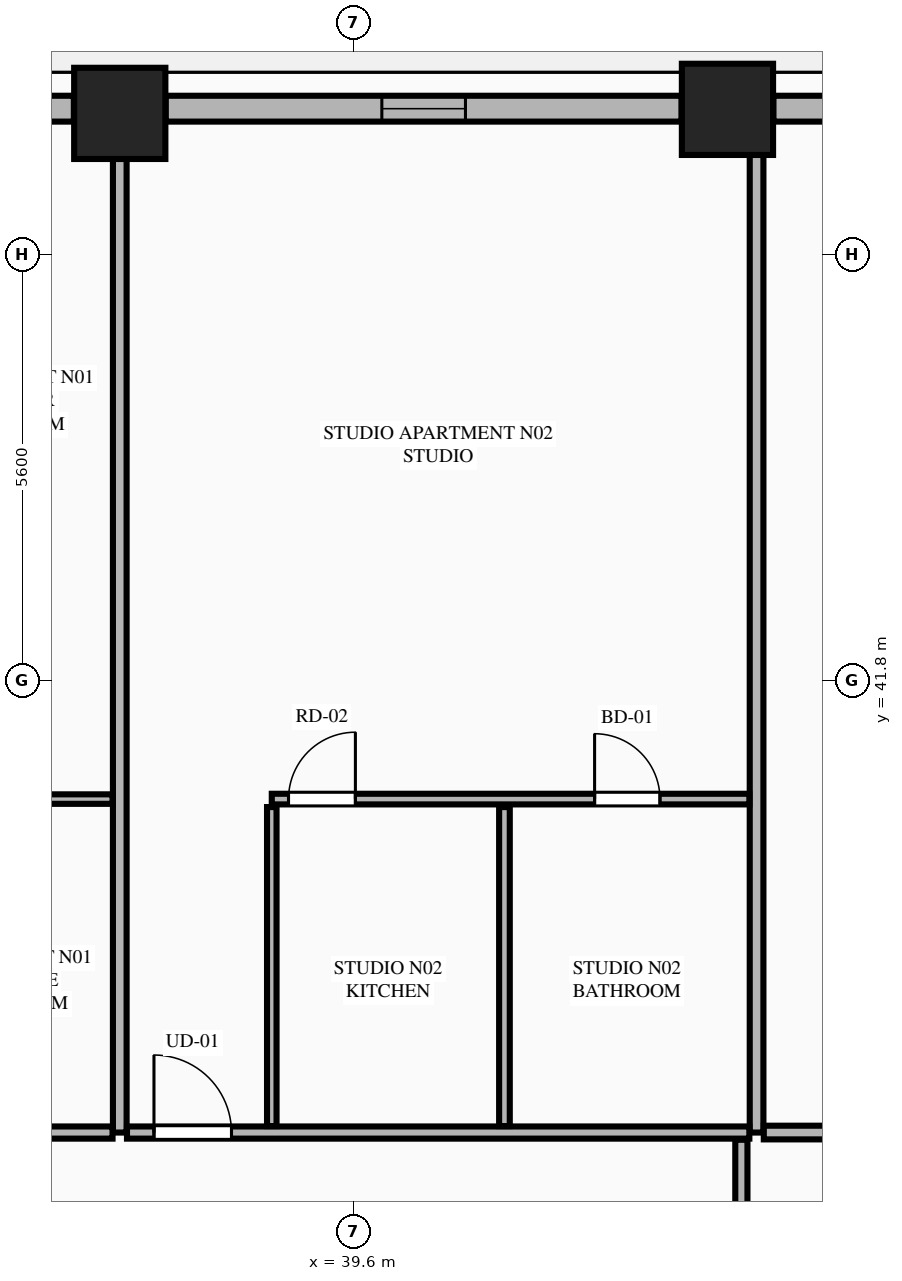
"""IFC4 building model, lengths in metres.
Left out: names, types, materials, properties, quantities, classifications, styles, units other than length and angle.
Written with IfcOpenShell. Run it as: python <this file> out.ifc"""

import sys

from ifc_helpers import new_model, si_unit, direction, frame, frame_2d, origin, origin_2d, place, context, subcontext, project, spatial, rectangle, extrude, element, fill, save


model = new_model("IFC4")
c1 = context("Model", 3, precision=1e-05, world=origin(), true_north=direction((0.0, 1.0)))
c2 = subcontext(c1, "Body", "Model", "MODEL_VIEW")
j1 = project(units=[si_unit("LENGTHUNIT", "METRE"), si_unit("PLANEANGLEUNIT", "RADIAN")], contexts=[c1])
p1 = place(None, origin())
s1 = spatial("IfcSite", under=j1, at=p1, CompositionType="ELEMENT")
p2 = place(p1, origin())
s2 = spatial("IfcBuilding", under=s1, at=p2, CompositionType="ELEMENT")
p3 = place(p2, frame((0.0, 0.0, 71.05)))
s3 = spatial("IfcBuildingStorey", under=s2, at=p3, CompositionType="ELEMENT", Elevation=71.05)
for number, where, z_axis, x_axis in (
    (1, (44.517, 49.311, 0.0), (0.0, 0.0, 1.0), (1.0, 0.0, 0.0)),
    (2, (36.522, 49.258, 0.0), (0.0, 0.0, 1.0), (1.0, 0.0, 0.0)),
):
    element("IfcColumn", number, at=place(p3, frame(where, z_axis=z_axis, x_axis=x_axis)), inside=s3, PredefinedType="COLUMN", context=c2, shape_type="SweptSolid", body=[
        extrude(rectangle(XDim=1.2, YDim=1.2, at=origin_2d()), origin(), (0.0, 0.0, 1.0), 3.55),
    ])
p4 = place(p3, frame((46.366, 49.32, 0.0), z_axis=(0.0, 0.0, 1.0), x_axis=(-1.0, 0.0, 0.0)))
e3 = element("IfcWall", 3, at=p4, inside=s3, PredefinedType="STANDARD", context=c2, shape_type="SweptSolid", body=[
    extrude(rectangle(XDim=1.245, YDim=0.34, at=frame_2d((0.623, 0.0))), origin(), (0.0, 0.0, 1.0), 3.27),
])
p5 = place(p3, frame((43.913, 49.32, 0.0), z_axis=(0.0, 0.0, 1.0), x_axis=(-1.0, 0.0, 0.0)))
e4 = element("IfcWall", 4, at=p5, inside=s3, PredefinedType="STANDARD", context=c2, shape_type="SweptSolid", body=[
    extrude(rectangle(XDim=6.787, YDim=0.34, at=frame_2d((3.394, 0.0))), origin(), (0.0, 0.0, 1.0), 2.652),
])
p6 = place(p5, frame((2.843, 0.0, 0.75)))
e5 = element("IfcOpeningElement", 5, at=p6, cuts=e4, PredefinedType="OPENING", context=c2, shape_type="SweptSolid", body=[
    extrude(rectangle(XDim=1.1, YDim=1.752, at=frame_2d((0.55, 0.876))), frame((0.0, 0.18, 0.0), z_axis=(0.0, -1.0, 0.0), x_axis=(1.0, 0.0, 0.0)), (0.0, 0.0, 1.0), 0.36),
])
p7 = place(p3, frame((35.918, 49.32, 0.0), z_axis=(0.0, 0.0, 1.0), x_axis=(-1.0, 0.0, 0.0)))
e6 = element("IfcWall", 6, at=p7, inside=s3, PredefinedType="STANDARD", context=c2, shape_type="SweptSolid", body=[
    extrude(rectangle(XDim=7.036, YDim=0.34, at=frame_2d((3.518, 0.0))), origin(), (0.0, 0.0, 1.0), 2.652),
])
p8 = place(p7, frame((3.374, 0.0, 0.0)))
e7 = element("IfcOpeningElement", 7, at=p8, cuts=e6, PredefinedType="OPENING", context=c2, shape_type="SweptSolid", body=[
    extrude(rectangle(XDim=1.1, YDim=2.25, at=frame_2d((0.55, 1.125))), frame((0.0, 0.18, 0.0), z_axis=(0.0, -1.0, 0.0), x_axis=(1.0, 0.0, 0.0)), (0.0, 0.0, 1.0), 0.36),
])
p9 = place(p7, frame((0.428, 0.0, 0.75)))
e8 = element("IfcOpeningElement", 8, at=p9, cuts=e6, PredefinedType="OPENING", context=c2, shape_type="SweptSolid", body=[
    extrude(rectangle(XDim=1.1, YDim=1.752, at=frame_2d((0.55, 0.876))), frame((0.0, 0.18, 0.0), z_axis=(0.0, -1.0, 0.0), x_axis=(1.0, 0.0, 0.0)), (0.0, 0.0, 1.0), 0.36),
])
p10 = place(p7, frame((6.013, 0.0, 0.75)))
e9 = element("IfcOpeningElement", 9, at=p10, cuts=e6, PredefinedType="OPENING", context=c2, shape_type="SweptSolid", body=[
    extrude(rectangle(XDim=0.813, YDim=1.752, at=frame_2d((0.406, 0.876))), frame((0.0, 0.18, 0.0), z_axis=(0.0, -1.0, 0.0), x_axis=(1.0, 0.0, 0.0)), (0.0, 0.0, 1.0), 0.36),
])
p11 = place(p3, frame((36.522, 35.85, 0.0), z_axis=(0.0, 0.0, 1.0), x_axis=(0.0, 1.0, 0.0)))
e10 = element("IfcWall", 10, at=p11, inside=s3, PredefinedType="PARTITIONING", context=c2, shape_type="SweptSolid", body=[
    extrude(rectangle(XDim=13.295, YDim=0.18, at=frame_2d((6.647, 0.0))), origin(), (0.0, 0.0, 1.0), 2.64),
])
p12 = place(p3, frame((44.9, 35.85, 0.0), z_axis=(0.0, 0.0, 1.0), x_axis=(0.0, 1.0, 0.0)))
e11 = element("IfcWall", 11, at=p12, inside=s3, PredefinedType="PARTITIONING", context=c2, shape_type="SweptSolid", body=[
    extrude(rectangle(XDim=13.295, YDim=0.18, at=frame_2d((6.647, 0.0))), origin(), (0.0, 0.0, 1.0), 3.27),
])
p13 = place(p3, frame((19.995, 35.85, 0.0), z_axis=(0.0, 0.0, 1.0), x_axis=(1.0, 0.0, 0.0)))
e12 = element("IfcWall", 12, at=p13, inside=s3, PredefinedType="PARTITIONING", context=c2, shape_type="SweptSolid", body=[
    extrude(rectangle(XDim=16.432, YDim=0.16, at=frame_2d((8.216, 0.0))), origin(), (0.0, 0.0, 1.0), 3.27),
])
p14 = place(p13, frame((0.705, 0.0, 0.0)))
e13 = element("IfcOpeningElement", 13, at=p14, cuts=e12, PredefinedType="OPENING", context=c2, shape_type="SweptSolid", body=[
    extrude(rectangle(XDim=1.35, YDim=2.35, at=frame_2d((0.675, 1.175))), frame((0.0, 0.09, 0.0), z_axis=(0.0, -1.0, 0.0), x_axis=(1.0, 0.0, 0.0)), (0.0, 0.0, 1.0), 0.18),
])
p15 = place(p3, frame((30.138, 40.237, 0.0), z_axis=(0.0, 0.0, 1.0), x_axis=(1.0, 0.0, 0.0)))
e14 = element("IfcWall", 14, at=p15, inside=s3, PredefinedType="PARTITIONING", context=c2, shape_type="SweptSolid", body=[
    extrude(rectangle(XDim=6.289, YDim=0.125, at=frame_2d((3.145, 0.0))), origin(), (0.0, 0.0, 1.0), 3.27),
])
p16 = place(p15, frame((4.575, 0.0, 0.0)))
e15 = element("IfcOpeningElement", 15, at=p16, cuts=e14, PredefinedType="OPENING", context=c2, shape_type="SweptSolid", body=[
    extrude(rectangle(XDim=0.86, YDim=2.1, at=frame_2d((0.43, 1.05))), frame((0.0, 0.073, 0.0), z_axis=(0.0, -1.0, 0.0), x_axis=(1.0, 0.0, 0.0)), (0.0, 0.0, 1.0), 0.145),
])
p17 = place(p15, frame((0.3, 0.0, 0.0)))
e16 = element("IfcOpeningElement", 16, at=p17, cuts=e14, PredefinedType="OPENING", context=c2, shape_type="SweptSolid", body=[
    extrude(rectangle(XDim=0.88, YDim=2.15, at=frame_2d((0.44, 1.075))), frame((0.0, 0.073, 0.0), z_axis=(0.0, -1.0, 0.0), x_axis=(1.0, 0.0, 0.0)), (0.0, 0.0, 1.0), 0.145),
])
p18 = place(p3, frame((36.617, 35.85, 0.0), z_axis=(0.0, 0.0, 1.0), x_axis=(1.0, 0.0, 0.0)))
e17 = element("IfcWall", 17, at=p18, inside=s3, PredefinedType="PARTITIONING", context=c2, shape_type="SweptSolid", body=[
    extrude(rectangle(XDim=8.188, YDim=0.16, at=frame_2d((4.094, 0.0))), origin(), (0.0, 0.0, 1.0), 3.27),
])
p19 = place(p18, frame((0.355, 0.0, 0.0)))
e18 = element("IfcOpeningElement", 18, at=p19, cuts=e17, PredefinedType="OPENING", context=c2, shape_type="SweptSolid", body=[
    extrude(rectangle(XDim=1.02, YDim=2.25, at=frame_2d((0.51, 1.125))), frame((0.0, 0.09, 0.0), z_axis=(0.0, -1.0, 0.0), x_axis=(1.0, 0.0, 0.0)), (0.0, 0.0, 1.0), 0.18),
])
p20 = place(p3, frame((38.522, 35.935, 0.0), z_axis=(0.0, 0.0, 1.0), x_axis=(0.0, 1.0, 0.0)))
e19 = element("IfcWall", 19, at=p20, inside=s3, PredefinedType="PARTITIONING", context=c2, shape_type="SweptSolid", body=[
    extrude(rectangle(XDim=4.197, YDim=0.125, at=frame_2d((2.099, 0.0))), origin(), (0.0, 0.0, 1.0), 3.27),
])
p21 = place(p3, frame((38.522, 40.237, 0.0), z_axis=(0.0, 0.0, 1.0), x_axis=(1.0, 0.0, 0.0)))
e20 = element("IfcWall", 20, at=p21, inside=s3, PredefinedType="PLUMBINGWALL", context=c2, shape_type="SweptSolid", body=[
    extrude(rectangle(XDim=6.283, YDim=0.14, at=frame_2d((3.142, 0.0))), origin(), (0.0, 0.0, 1.0), 3.27),
])
p22 = place(p21, frame((4.247, 0.0, 0.0)))
e21 = element("IfcOpeningElement", 21, at=p22, cuts=e20, PredefinedType="OPENING", context=c2, shape_type="SweptSolid", body=[
    extrude(rectangle(XDim=0.86, YDim=2.1, at=frame_2d((0.43, 1.05))), frame((0.0, 0.08, 0.0), z_axis=(0.0, -1.0, 0.0), x_axis=(1.0, 0.0, 0.0)), (0.0, 0.0, 1.0), 0.16),
])
p23 = place(p21, frame((0.22, 0.0, 0.0)))
e22 = element("IfcOpeningElement", 22, at=p23, cuts=e20, PredefinedType="OPENING", context=c2, shape_type="SweptSolid", body=[
    extrude(rectangle(XDim=0.88, YDim=2.15, at=frame_2d((0.44, 1.075))), frame((0.0, 0.08, 0.0), z_axis=(0.0, -1.0, 0.0), x_axis=(1.0, 0.0, 0.0)), (0.0, 0.0, 1.0), 0.16),
])
p24 = place(p3, frame((41.583, 35.935, 0.0), z_axis=(0.0, 0.0, 1.0), x_axis=(0.0, 1.0, 0.0)))
e23 = element("IfcWall", 23, at=p24, inside=s3, PredefinedType="PLUMBINGWALL", context=c2, shape_type="SweptSolid", body=[
    extrude(rectangle(XDim=4.197, YDim=0.14, at=frame_2d((2.099, 0.0))), origin(), (0.0, 0.0, 1.0), 3.27),
])
p25 = place(p3, frame((44.995, 35.85, 0.0), z_axis=(0.0, 0.0, 1.0), x_axis=(1.0, 0.0, 0.0)))
e24 = element("IfcWall", 24, at=p25, inside=s3, PredefinedType="PARTITIONING", context=c2, shape_type="SweptSolid", body=[
    extrude(rectangle(XDim=9.14, YDim=0.18, at=frame_2d((4.57, 0.0))), origin(), (0.0, 0.0, 1.0), 3.27),
])
p26 = place(p3, frame((44.7, 25.0, 0.0), z_axis=(0.0, 0.0, 1.0), x_axis=(0.0, 1.0, 0.0)))
e25 = element("IfcWall", 25, at=p26, inside=s3, PredefinedType="PARTITIONING", context=c2, shape_type="SweptSolid", body=[
    extrude(rectangle(XDim=10.755, YDim=0.16, at=frame_2d((5.377, 0.0))), origin(), (0.0, 0.0, 1.0), 2.64),
])
p27 = place(p26, frame((0.45, 0.0, 0.0)))
e26 = element("IfcOpeningElement", 26, at=p27, cuts=e25, PredefinedType="OPENING", context=c2, shape_type="SweptSolid", body=[
    extrude(rectangle(XDim=1.02, YDim=2.25, at=frame_2d((0.51, 1.125))), frame((0.0, 0.09, 0.0), z_axis=(0.0, -1.0, 0.0), x_axis=(1.0, 0.0, 0.0)), (0.0, 0.0, 1.0), 0.18),
])
p28 = place(p6, origin())
e27 = element("IfcWindow", 27, at=p28, inside=s3, PartitioningType="SINGLE_PANEL", PredefinedType="WINDOW", context=c2, shape_type="SweptSolid", body=[
    extrude(rectangle(XDim=1.1, YDim=1.752, at=frame_2d((0.55, 0.876))), frame((0.0, 0.03, 0.0), z_axis=(0.0, -1.0, 0.0), x_axis=(1.0, 0.0, 0.0)), (0.0, 0.0, 1.0), 0.06),
])
fill(e5, e27)
p29 = place(p22, origin())
e28 = element("IfcDoor", 28, at=p29, inside=s3, OperationType="SINGLE_SWING_LEFT", PredefinedType="DOOR", context=c2, shape_type="SweptSolid", body=[
    extrude(rectangle(XDim=0.86, YDim=2.1, at=frame_2d((0.43, 1.05))), frame((0.0, 0.025, 0.0), z_axis=(0.0, -1.0, 0.0), x_axis=(1.0, 0.0, 0.0)), (0.0, 0.0, 1.0), 0.05),
])
fill(e21, e28)
p30 = place(p19, origin())
e29 = element("IfcDoor", 29, at=p30, inside=s3, OperationType="SINGLE_SWING_LEFT", PredefinedType="DOOR", context=c2, shape_type="SweptSolid", body=[
    extrude(rectangle(XDim=1.02, YDim=2.25, at=frame_2d((0.51, 1.125))), frame((0.0, 0.025, 0.0), z_axis=(0.0, -1.0, 0.0), x_axis=(1.0, 0.0, 0.0)), (0.0, 0.0, 1.0), 0.05),
])
fill(e18, e29)
p31 = place(p23, origin())
e30 = element("IfcDoor", 30, at=p31, inside=s3, OperationType="SINGLE_SWING_RIGHT", PredefinedType="DOOR", context=c2, shape_type="SweptSolid", body=[
    extrude(rectangle(XDim=0.88, YDim=2.15, at=frame_2d((0.44, 1.075))), frame((0.0, 0.025, 0.0), z_axis=(0.0, -1.0, 0.0), x_axis=(1.0, 0.0, 0.0)), (0.0, 0.0, 1.0), 0.05),
])
fill(e22, e30)
save(model, sys.argv[1])
